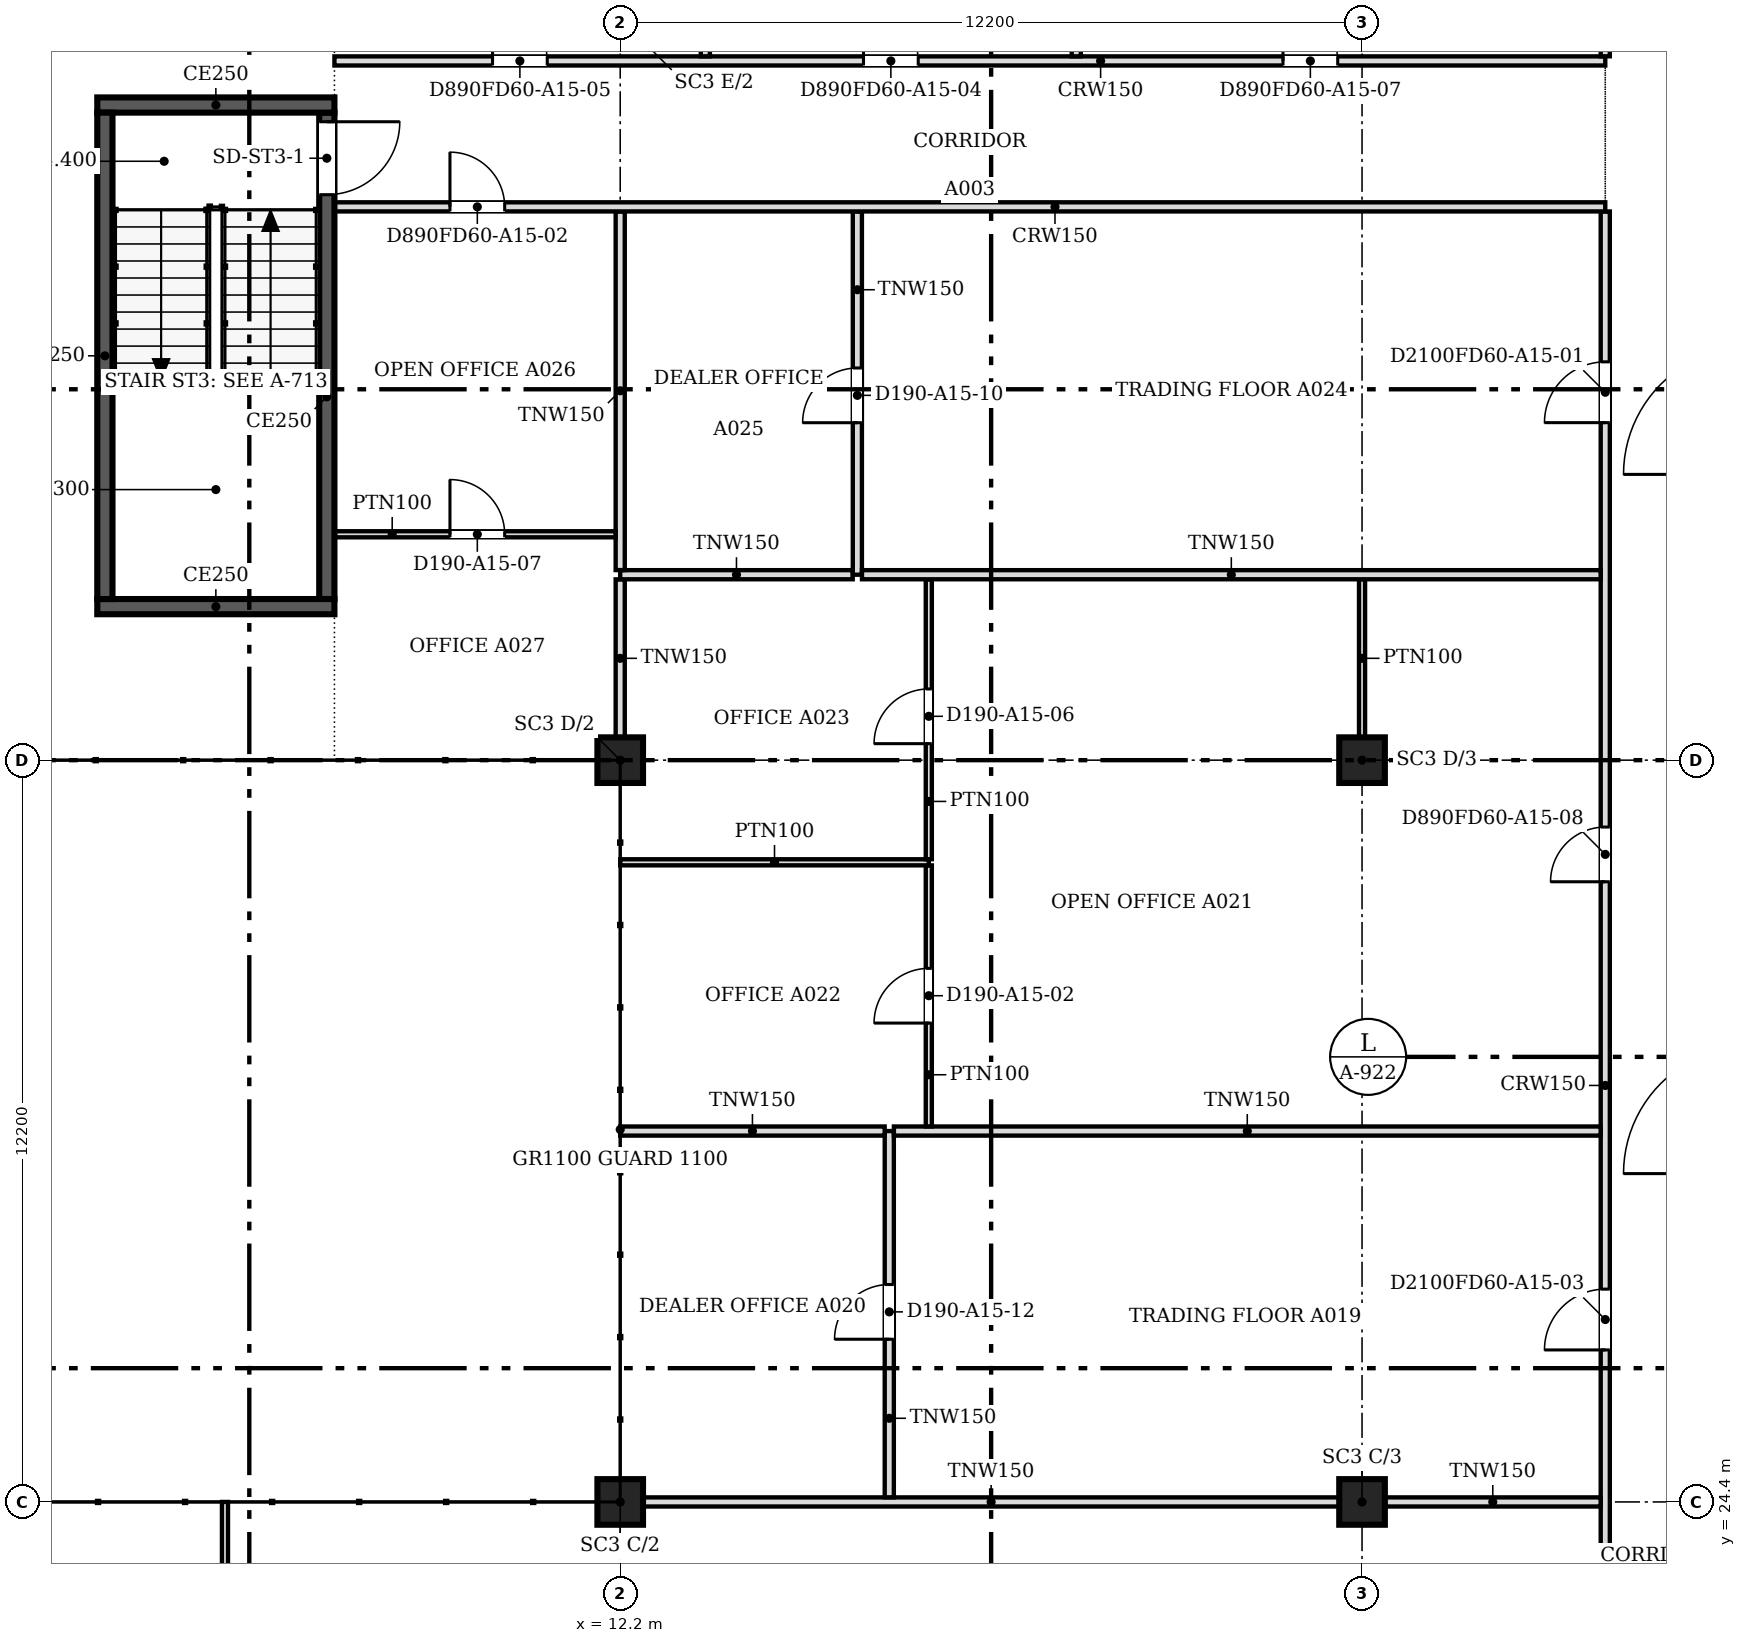
"""IFC4 building model, lengths in metres.
Left out: names, types, materials, properties, quantities, classifications, styles, units other than length and angle.
Written with IfcOpenShell. Run it as: python <this file> out.ifc"""

import sys

from ifc_helpers import new_model, si_unit, direction, frame, frame_2d, origin, origin_2d, place, context, subcontext, project, spatial, rectangle, extrude, source, transform, mapped, element, fill, save


model = new_model("IFC4")
c1 = context("Model", 3, precision=1e-05, world=origin(), true_north=direction((0.0, 1.0)))
c2 = subcontext(c1, "Body", "Model", "MODEL_VIEW")
j1 = project(units=[si_unit("LENGTHUNIT", "METRE"), si_unit("PLANEANGLEUNIT", "RADIAN")], contexts=[c1])
p1 = place(None, origin())
s1 = spatial("IfcSite", under=j1, at=p1, CompositionType="ELEMENT")
p2 = place(p1, origin())
s2 = spatial("IfcBuilding", under=s1, at=p2, CompositionType="ELEMENT")
p3 = place(p2, frame((0.0, 0.0, 170.6)))
s3 = spatial("IfcBuildingStorey", under=s2, at=p3, CompositionType="ELEMENT", Elevation=170.6)
for number, where, z_axis, x_axis in (
    (1, (12.2, 24.4, 0.0), (0.0, 0.0, 1.0), (1.0, 0.0, 0.0)),
    (2, (12.2, 36.6, 0.0), (0.0, 0.0, 1.0), (1.0, 0.0, 0.0)),
    (3, (24.4, 24.4, 0.0), (0.0, 0.0, 1.0), (1.0, 0.0, 0.0)),
    (4, (24.4, 36.6, 0.0), (0.0, 0.0, 1.0), (1.0, 0.0, 0.0)),
):
    element("IfcColumn", number, at=place(p3, frame(where, z_axis=z_axis, x_axis=x_axis)), inside=s3, PredefinedType="COLUMN", context=c2, shape_type="SweptSolid", body=[
        extrude(rectangle(XDim=0.75, YDim=0.75, at=origin_2d()), origin(), (0.0, 0.0, 1.0), 3.6),
    ])
p4 = place(p3, frame((7.5, 39.125, 0.0), z_axis=(0.0, 0.0, 1.0), x_axis=(-1.0, 0.0, 0.0)))
e5 = element("IfcWall", 5, at=p4, inside=s3, PredefinedType="SOLIDWALL", context=c2, shape_type="SweptSolid", body=[
    extrude(rectangle(XDim=3.9, YDim=0.25, at=frame_2d((1.95, 0.0))), origin(), (0.0, 0.0, 1.0), 3.8),
])
p5 = place(p3, frame((3.725, 39.25, 0.0), z_axis=(0.0, 0.0, 1.0), x_axis=(0.0, 1.0, 0.0)))
e6 = element("IfcWall", 6, at=p5, inside=s3, PredefinedType="SOLIDWALL", context=c2, shape_type="SweptSolid", body=[
    extrude(rectangle(XDim=8.0, YDim=0.25, at=frame_2d((4.0, 0.0))), origin(), (0.0, 0.0, 1.0), 3.8),
])
p6 = place(p3, frame((3.6, 47.375, 0.0), z_axis=(0.0, 0.0, 1.0), x_axis=(1.0, 0.0, 0.0)))
e7 = element("IfcWall", 7, at=p6, inside=s3, PredefinedType="SOLIDWALL", context=c2, shape_type="SweptSolid", body=[
    extrude(rectangle(XDim=3.9, YDim=0.25, at=frame_2d((1.95, 0.0))), origin(), (0.0, 0.0, 1.0), 3.8),
])
p7 = place(p3, frame((7.375, 47.25, 0.0), z_axis=(0.0, 0.0, 1.0), x_axis=(0.0, -1.0, 0.0)))
e8 = element("IfcWall", 8, at=p7, inside=s3, PredefinedType="SOLIDWALL", context=c2, shape_type="SweptSolid", body=[
    extrude(rectangle(XDim=8.0, YDim=0.25, at=frame_2d((4.0, 0.0))), origin(), (0.0, 0.0, 1.0), 3.8),
])
m1 = source(origin(), c2, "Body", "SweptSolid", [
    extrude(rectangle(XDim=1.2, YDim=2.1, at=frame_2d((0.6, 1.05))), frame((0.0, 0.135, 0.0), z_axis=(0.0, -1.0, 0.0), x_axis=(1.0, 0.0, 0.0)), (0.0, 0.0, 1.0), 0.27),
])
p8 = place(p7, frame((0.15, 0.0, 0.0)))
e9 = element("IfcOpeningElement", 9, at=p8, cuts=e8, PredefinedType="OPENING", context=c2, shape_type="MappedRepresentation", body=[
    mapped(m1, transform((0.0, 0.0, 0.0), scale=1.0)),
])
p9 = place(p3, frame((28.4, 18.8, 0.0), z_axis=(0.0, 0.0, 1.0), x_axis=(0.0, 1.0, 0.0)))
e10 = element("IfcWall", 10, at=p9, inside=s3, PredefinedType="PARTITIONING", context=c2, shape_type="SweptSolid", body=[
    extrude(rectangle(XDim=26.824, YDim=0.15, at=frame_2d((13.412, 0.0))), origin(), (0.0, 0.0, 1.0), 3.067),
])
m2 = source(origin(), c2, "Body", "SweptSolid", [
    extrude(rectangle(XDim=0.9, YDim=2.1, at=frame_2d((0.45, 1.05))), frame((0.0, 0.085, 0.0), z_axis=(0.0, -1.0, 0.0), x_axis=(1.0, 0.0, 0.0)), (0.0, 0.0, 1.0), 0.17),
])
p10 = place(p9, frame((1.3, 0.0, 0.0)))
e11 = element("IfcOpeningElement", 11, at=p10, cuts=e10, PredefinedType="OPENING", context=c2, shape_type="MappedRepresentation", body=[
    mapped(m2, transform((0.0, 0.0, 0.0), scale=1.0)),
])
m3 = source(origin(), c2, "Body", "SweptSolid", [
    extrude(rectangle(XDim=1.0, YDim=2.1, at=frame_2d((0.5, 1.05))), frame((0.0, 0.085, 0.0), z_axis=(0.0, -1.0, 0.0), x_axis=(1.0, 0.0, 0.0)), (0.0, 0.0, 1.0), 0.17),
])
p11 = place(p9, frame((23.351, 0.0, 0.0)))
e12 = element("IfcOpeningElement", 12, at=p11, cuts=e10, PredefinedType="OPENING", context=c2, shape_type="MappedRepresentation", body=[
    mapped(m3, transform((0.0, 0.0, 0.0), scale=1.0)),
])
p12 = place(p9, frame((8.1, 0.0, 0.0)))
e13 = element("IfcOpeningElement", 13, at=p12, cuts=e10, PredefinedType="OPENING", context=c2, shape_type="MappedRepresentation", body=[
    mapped(m3, transform((0.0, 0.0, 0.0), scale=1.0)),
])
p13 = place(p9, frame((15.8, 0.0, 0.0)))
e14 = element("IfcOpeningElement", 14, at=p13, cuts=e10, PredefinedType="OPENING", context=c2, shape_type="MappedRepresentation", body=[
    mapped(m2, transform((0.0, 0.0, 0.0), scale=1.0)),
])
p14 = place(p3, frame((5.7, 18.99, 0.0), z_axis=(0.0, 0.0, 1.0), x_axis=(0.0, 1.0, 0.0)))
e15 = element("IfcWall", 15, at=p14, inside=s3, PredefinedType="PARTITIONING", context=c2, shape_type="SweptSolid", body=[
    extrude(rectangle(XDim=5.41, YDim=0.1, at=frame_2d((2.705, 0.0))), origin(), (0.0, 0.0, 1.0), 3.067),
])
m4 = source(origin(), c2, "Body", "SweptSolid", [
    extrude(rectangle(XDim=0.9, YDim=2.1, at=frame_2d((0.45, 1.05))), frame((0.0, 0.06, 0.0), z_axis=(0.0, -1.0, 0.0), x_axis=(1.0, 0.0, 0.0)), (0.0, 0.0, 1.0), 0.12),
])
p15 = place(p14, frame((2.3, 0.0, 0.0)))
e16 = element("IfcOpeningElement", 16, at=p15, cuts=e15, PredefinedType="OPENING", context=c2, shape_type="MappedRepresentation", body=[
    mapped(m4, transform((0.0, 0.0, 0.0), scale=1.0)),
])
p16 = place(p3, frame((12.576, 24.4, 0.0), z_axis=(0.0, 0.0, 1.0), x_axis=(1.0, 0.0, 0.0)))
e17 = element("IfcWall", 17, at=p16, inside=s3, PredefinedType="PARTITIONING", context=c2, shape_type="SweptSolid", body=[
    extrude(rectangle(XDim=11.448, YDim=0.15, at=frame_2d((5.724, 0.0))), origin(), (0.0, 0.0, 1.0), 3.067),
])
p17 = place(p3, frame((24.776, 24.4, 0.0), z_axis=(0.0, 0.0, 1.0), x_axis=(1.0, 0.0, 0.0)))
e18 = element("IfcWall", 18, at=p17, inside=s3, PredefinedType="PARTITIONING", context=c2, shape_type="SweptSolid", body=[
    extrude(rectangle(XDim=3.548, YDim=0.15, at=frame_2d((1.774, 0.0))), origin(), (0.0, 0.0, 1.0), 3.067),
])
p18 = place(p3, frame((16.625, 24.476, 0.0), z_axis=(0.0, 0.0, 1.0), x_axis=(0.0, 1.0, 0.0)))
e19 = element("IfcWall", 19, at=p18, inside=s3, PredefinedType="PARTITIONING", context=c2, shape_type="SweptSolid", body=[
    extrude(rectangle(XDim=6.024, YDim=0.15, at=frame_2d((3.012, 0.0))), origin(), (0.0, 0.0, 1.0), 3.067),
])
p19 = place(p18, frame((2.6, 0.0, 0.0)))
e20 = element("IfcOpeningElement", 20, at=p19, cuts=e19, PredefinedType="OPENING", context=c2, shape_type="MappedRepresentation", body=[
    mapped(m2, transform((0.0, 0.0, 0.0), scale=1.0)),
])
p20 = place(p3, frame((12.2, 30.5, 0.0), z_axis=(0.0, 0.0, 1.0), x_axis=(1.0, 0.0, 0.0)))
e21 = element("IfcWall", 21, at=p20, inside=s3, PredefinedType="PARTITIONING", context=c2, shape_type="SweptSolid", body=[
    extrude(rectangle(XDim=4.349, YDim=0.15, at=frame_2d((2.175, 0.0))), origin(), (0.0, 0.0, 1.0), 3.067),
])
p21 = place(p3, frame((16.701, 30.5, 0.0), z_axis=(0.0, 0.0, 1.0), x_axis=(1.0, 0.0, 0.0)))
e22 = element("IfcWall", 22, at=p21, inside=s3, PredefinedType="PARTITIONING", context=c2, shape_type="SweptSolid", body=[
    extrude(rectangle(XDim=11.623, YDim=0.15, at=frame_2d((5.812, 0.0))), origin(), (0.0, 0.0, 1.0), 3.067),
])
p22 = place(p3, frame((17.275, 30.576, 0.0), z_axis=(0.0, 0.0, 1.0), x_axis=(0.0, 1.0, 0.0)))
e23 = element("IfcWall", 23, at=p22, inside=s3, PredefinedType="PARTITIONING", context=c2, shape_type="SweptSolid", body=[
    extrude(rectangle(XDim=4.293, YDim=0.1, at=frame_2d((2.147, 0.0))), origin(), (0.0, 0.0, 1.0), 3.067),
])
p23 = place(p22, frame((1.7, 0.0, 0.0)))
e24 = element("IfcOpeningElement", 24, at=p23, cuts=e23, PredefinedType="OPENING", context=c2, shape_type="MappedRepresentation", body=[
    mapped(m4, transform((0.0, 0.0, 0.0), scale=1.0)),
])
p24 = place(p3, frame((12.2, 34.92, 0.0), z_axis=(0.0, 0.0, 1.0), x_axis=(1.0, 0.0, 0.0)))
e25 = element("IfcWall", 25, at=p24, inside=s3, PredefinedType="PARTITIONING", context=c2, shape_type="SweptSolid", body=[
    extrude(rectangle(XDim=5.075, YDim=0.1, at=frame_2d((2.538, 0.0))), origin(), (0.0, 0.0, 1.0), 3.067),
])
p25 = place(p3, frame((17.275, 34.971, 0.0), z_axis=(0.0, 0.0, 1.0), x_axis=(0.0, 1.0, 0.0)))
e26 = element("IfcWall", 26, at=p25, inside=s3, PredefinedType="PARTITIONING", context=c2, shape_type="SweptSolid", body=[
    extrude(rectangle(XDim=4.603, YDim=0.1, at=frame_2d((2.301, 0.0))), origin(), (0.0, 0.0, 1.0), 3.067),
])
p26 = place(p25, frame((1.9, 0.0, 0.0)))
e27 = element("IfcOpeningElement", 27, at=p26, cuts=e26, PredefinedType="OPENING", context=c2, shape_type="MappedRepresentation", body=[
    mapped(m4, transform((0.0, 0.0, 0.0), scale=1.0)),
])
p27 = place(p3, frame((12.2, 36.976, 0.0), z_axis=(0.0, 0.0, 1.0), x_axis=(0.0, 1.0, 0.0)))
e28 = element("IfcWall", 28, at=p27, inside=s3, PredefinedType="PARTITIONING", context=c2, shape_type="SweptSolid", body=[
    extrude(rectangle(XDim=2.598, YDim=0.15, at=frame_2d((1.299, 0.0))), origin(), (0.0, 0.0, 1.0), 3.067),
])
p28 = place(p3, frame((24.4, 36.975, 0.0), z_axis=(0.0, 0.0, 1.0), x_axis=(0.0, 1.0, 0.0)))
e29 = element("IfcWall", 29, at=p28, inside=s3, PredefinedType="PARTITIONING", context=c2, shape_type="SweptSolid", body=[
    extrude(rectangle(XDim=2.6, YDim=0.1, at=frame_2d((1.3, 0.0))), origin(), (0.0, 0.0, 1.0), 3.067),
])
p29 = place(p3, frame((12.2, 39.65, 0.0), z_axis=(0.0, 0.0, 1.0), x_axis=(1.0, 0.0, 0.0)))
e30 = element("IfcWall", 30, at=p29, inside=s3, PredefinedType="PARTITIONING", context=c2, shape_type="SweptSolid", body=[
    extrude(rectangle(XDim=3.824, YDim=0.15, at=frame_2d((1.912, 0.0))), origin(), (0.0, 0.0, 1.0), 3.067),
])
p30 = place(p3, frame((16.1, 39.65, 0.0), z_axis=(0.0, 0.0, 1.0), x_axis=(0.0, 1.0, 0.0)))
e31 = element("IfcWall", 31, at=p30, inside=s3, PredefinedType="PARTITIONING", context=c2, shape_type="SweptSolid", body=[
    extrude(rectangle(XDim=5.974, YDim=0.15, at=frame_2d((2.987, 0.0))), origin(), (0.0, 0.0, 1.0), 3.067),
])
p31 = place(p30, frame((2.5, 0.0, 0.0)))
e32 = element("IfcOpeningElement", 32, at=p31, cuts=e31, PredefinedType="OPENING", context=c2, shape_type="MappedRepresentation", body=[
    mapped(m2, transform((0.0, 0.0, 0.0), scale=1.0)),
])
p32 = place(p3, frame((16.176, 39.65, 0.0), z_axis=(0.0, 0.0, 1.0), x_axis=(1.0, 0.0, 0.0)))
e33 = element("IfcWall", 33, at=p32, inside=s3, PredefinedType="PARTITIONING", context=c2, shape_type="SweptSolid", body=[
    extrude(rectangle(XDim=12.148, YDim=0.15, at=frame_2d((6.074, 0.0))), origin(), (0.0, 0.0, 1.0), 3.067),
])
p33 = place(p3, frame((12.2, 39.726, 0.0), z_axis=(0.0, 0.0, 1.0), x_axis=(0.0, 1.0, 0.0)))
e34 = element("IfcWall", 34, at=p33, inside=s3, PredefinedType="PARTITIONING", context=c2, shape_type="SweptSolid", body=[
    extrude(rectangle(XDim=5.898, YDim=0.15, at=frame_2d((2.949, 0.0))), origin(), (0.0, 0.0, 1.0), 3.067),
])
p34 = place(p3, frame((12.124, 40.315, 0.0), z_axis=(0.0, 0.0, 1.0), x_axis=(-1.0, 0.0, 0.0)))
e35 = element("IfcWall", 35, at=p34, inside=s3, PredefinedType="PARTITIONING", context=c2, shape_type="SweptSolid", body=[
    extrude(rectangle(XDim=4.624, YDim=0.1, at=frame_2d((2.312, 0.0))), origin(), (0.0, 0.0, 1.0), 3.067),
])
p35 = place(p34, frame((1.824, 0.0, 0.0)))
e36 = element("IfcOpeningElement", 36, at=p35, cuts=e35, PredefinedType="OPENING", context=c2, shape_type="MappedRepresentation", body=[
    mapped(m4, transform((0.0, 0.0, 0.0), scale=1.0)),
])
p36 = place(p3, frame((28.4, 45.7, 0.0), z_axis=(0.0, 0.0, 1.0), x_axis=(-1.0, 0.0, 0.0)))
e37 = element("IfcWall", 37, at=p36, inside=s3, PredefinedType="PARTITIONING", context=c2, shape_type="SweptSolid", body=[
    extrude(rectangle(XDim=20.9, YDim=0.15, at=frame_2d((10.45, 0.0))), origin(), (0.0, 0.0, 1.0), 3.067),
])
p37 = place(p36, frame((18.1, 0.0, 0.0)))
e38 = element("IfcOpeningElement", 38, at=p37, cuts=e37, PredefinedType="OPENING", context=c2, shape_type="MappedRepresentation", body=[
    mapped(m2, transform((0.0, 0.0, 0.0), scale=1.0)),
])
p38 = place(p3, frame((7.5, 48.1, 0.0), z_axis=(0.0, 0.0, 1.0), x_axis=(1.0, 0.0, 0.0)))
e39 = element("IfcWall", 39, at=p38, inside=s3, PredefinedType="PARTITIONING", context=c2, shape_type="SweptSolid", body=[
    extrude(rectangle(XDim=20.9, YDim=0.15, at=frame_2d((10.45, 0.0))), origin(), (0.0, 0.0, 1.0), 3.067),
])
p39 = place(p38, frame((8.701, 0.0, 0.0)))
e40 = element("IfcOpeningElement", 40, at=p39, cuts=e39, PredefinedType="OPENING", context=c2, shape_type="MappedRepresentation", body=[
    mapped(m2, transform((0.0, 0.0, 0.0), scale=1.0)),
])
p40 = place(p38, frame((2.6, 0.0, 0.0)))
e41 = element("IfcOpeningElement", 41, at=p40, cuts=e39, PredefinedType="OPENING", context=c2, shape_type="MappedRepresentation", body=[
    mapped(m2, transform((0.0, 0.0, 0.0), scale=1.0)),
])
p41 = place(p38, frame((15.6, 0.0, 0.0)))
e42 = element("IfcOpeningElement", 42, at=p41, cuts=e39, PredefinedType="OPENING", context=c2, shape_type="MappedRepresentation", body=[
    mapped(m2, transform((0.0, 0.0, 0.0), scale=1.0)),
])
p42 = place(p3, frame((13.6, 48.176, 0.0), z_axis=(0.0, 0.0, 1.0), x_axis=(0.0, 1.0, 0.0)))
e43 = element("IfcWall", 43, at=p42, inside=s3, PredefinedType="PARTITIONING", context=c2, shape_type="SweptSolid", body=[
    extrude(rectangle(XDim=2.924, YDim=0.15, at=frame_2d((1.462, 0.0))), origin(), (0.0, 0.0, 1.0), 3.067),
])
p43 = place(p3, frame((19.7, 48.176, 0.0), z_axis=(0.0, 0.0, 1.0), x_axis=(0.0, 1.0, 0.0)))
e44 = element("IfcWall", 44, at=p43, inside=s3, PredefinedType="PARTITIONING", context=c2, shape_type="SweptSolid", body=[
    extrude(rectangle(XDim=6.224, YDim=0.15, at=frame_2d((3.112, 0.0))), origin(), (0.0, 0.0, 1.0), 3.067),
])
p44 = place(p3, frame((28.4, 48.176, 0.0), z_axis=(0.0, 0.0, 1.0), x_axis=(0.0, 1.0, 0.0)))
e45 = element("IfcWall", 45, at=p44, inside=s3, PredefinedType="PARTITIONING", context=c2, shape_type="SweptSolid", body=[
    extrude(rectangle(XDim=2.549, YDim=0.15, at=frame_2d((1.274, 0.0))), origin(), (0.0, 0.0, 1.0), 3.067),
])
m5 = source(origin(), c2, "Body", "SweptSolid", [
    extrude(rectangle(XDim=1.2, YDim=2.1, at=frame_2d((0.6, 1.05))), frame((0.0, 0.025, 0.0), z_axis=(0.0, -1.0, 0.0), x_axis=(1.0, 0.0, 0.0)), (0.0, 0.0, 1.0), 0.05),
])
p45 = place(p8, origin())
e46 = element("IfcDoor", 46, at=p45, inside=s3, OperationType="SINGLE_SWING_LEFT", PredefinedType="DOOR", context=c2, shape_type="MappedRepresentation", body=[
    mapped(m5, transform((0.0, 0.0, 0.0), scale=1.0)),
])
fill(e9, e46)
m6 = source(origin(), c2, "Body", "SweptSolid", [
    extrude(rectangle(XDim=0.9, YDim=2.1, at=frame_2d((0.45, 1.05))), frame((0.0, 0.025, 0.0), z_axis=(0.0, -1.0, 0.0), x_axis=(1.0, 0.0, 0.0)), (0.0, 0.0, 1.0), 0.05),
])
p46 = place(p23, origin())
e47 = element("IfcDoor", 47, at=p46, inside=s3, OperationType="SINGLE_SWING_LEFT", PredefinedType="DOOR", context=c2, shape_type="MappedRepresentation", body=[
    mapped(m6, transform((0.0, 0.0, 0.0), scale=1.0)),
])
fill(e24, e47)
p47 = place(p26, origin())
e48 = element("IfcDoor", 48, at=p47, inside=s3, OperationType="SINGLE_SWING_LEFT", PredefinedType="DOOR", context=c2, shape_type="MappedRepresentation", body=[
    mapped(m6, transform((0.0, 0.0, 0.0), scale=1.0)),
])
fill(e27, e48)
p48 = place(p35, origin())
e49 = element("IfcDoor", 49, at=p48, inside=s3, OperationType="SINGLE_SWING_RIGHT", PredefinedType="DOOR", context=c2, shape_type="MappedRepresentation", body=[
    mapped(m6, transform((0.0, 0.0, 0.0), scale=1.0)),
])
fill(e36, e49)
p49 = place(p37, origin())
e50 = element("IfcDoor", 50, at=p49, inside=s3, OperationType="SINGLE_SWING_RIGHT", PredefinedType="DOOR", context=c2, shape_type="MappedRepresentation", body=[
    mapped(m6, transform((0.0, 0.0, 0.0), scale=1.0)),
])
fill(e38, e50)
m7 = source(origin(), c2, "Body", "SweptSolid", [
    extrude(rectangle(XDim=1.0, YDim=2.1, at=frame_2d((0.5, 1.05))), frame((0.0, 0.025, 0.0), z_axis=(0.0, -1.0, 0.0), x_axis=(1.0, 0.0, 0.0)), (0.0, 0.0, 1.0), 0.05),
])
p50 = place(p11, origin())
e51 = element("IfcDoor", 51, at=p50, inside=s3, OperationType="SINGLE_SWING_LEFT", PredefinedType="DOOR", context=c2, shape_type="MappedRepresentation", body=[
    mapped(m7, transform((0.0, 0.0, 0.0), scale=1.0)),
])
fill(e12, e51)
p51 = place(p31, origin())
e52 = element("IfcDoor", 52, at=p51, inside=s3, OperationType="SINGLE_SWING_LEFT", PredefinedType="DOOR", context=c2, shape_type="MappedRepresentation", body=[
    mapped(m6, transform((0.0, 0.0, 0.0), scale=1.0)),
])
fill(e32, e52)
p52 = place(p19, origin())
e53 = element("IfcDoor", 53, at=p52, inside=s3, OperationType="SINGLE_SWING_LEFT", PredefinedType="DOOR", context=c2, shape_type="MappedRepresentation", body=[
    mapped(m6, transform((0.0, 0.0, 0.0), scale=1.0)),
])
fill(e20, e53)
p53 = place(p39, origin())
e54 = element("IfcDoor", 54, at=p53, inside=s3, OperationType="SINGLE_SWING_LEFT", PredefinedType="DOOR", context=c2, shape_type="MappedRepresentation", body=[
    mapped(m6, transform((0.0, 0.0, 0.0), scale=1.0)),
])
fill(e40, e54)
p54 = place(p12, origin())
e55 = element("IfcDoor", 55, at=p54, inside=s3, OperationType="SINGLE_SWING_LEFT", PredefinedType="DOOR", context=c2, shape_type="MappedRepresentation", body=[
    mapped(m7, transform((0.0, 0.0, 0.0), scale=1.0)),
])
fill(e13, e55)
p55 = place(p40, origin())
e56 = element("IfcDoor", 56, at=p55, inside=s3, OperationType="SINGLE_SWING_LEFT", PredefinedType="DOOR", context=c2, shape_type="MappedRepresentation", body=[
    mapped(m6, transform((0.0, 0.0, 0.0), scale=1.0)),
])
fill(e41, e56)
p56 = place(p41, origin())
e57 = element("IfcDoor", 57, at=p56, inside=s3, OperationType="SINGLE_SWING_LEFT", PredefinedType="DOOR", context=c2, shape_type="MappedRepresentation", body=[
    mapped(m6, transform((0.0, 0.0, 0.0), scale=1.0)),
])
fill(e42, e57)
p57 = place(p13, origin())
e58 = element("IfcDoor", 58, at=p57, inside=s3, OperationType="SINGLE_SWING_LEFT", PredefinedType="DOOR", context=c2, shape_type="MappedRepresentation", body=[
    mapped(m6, transform((0.0, 0.0, 0.0), scale=1.0)),
])
fill(e14, e58)
save(model, sys.argv[1])
